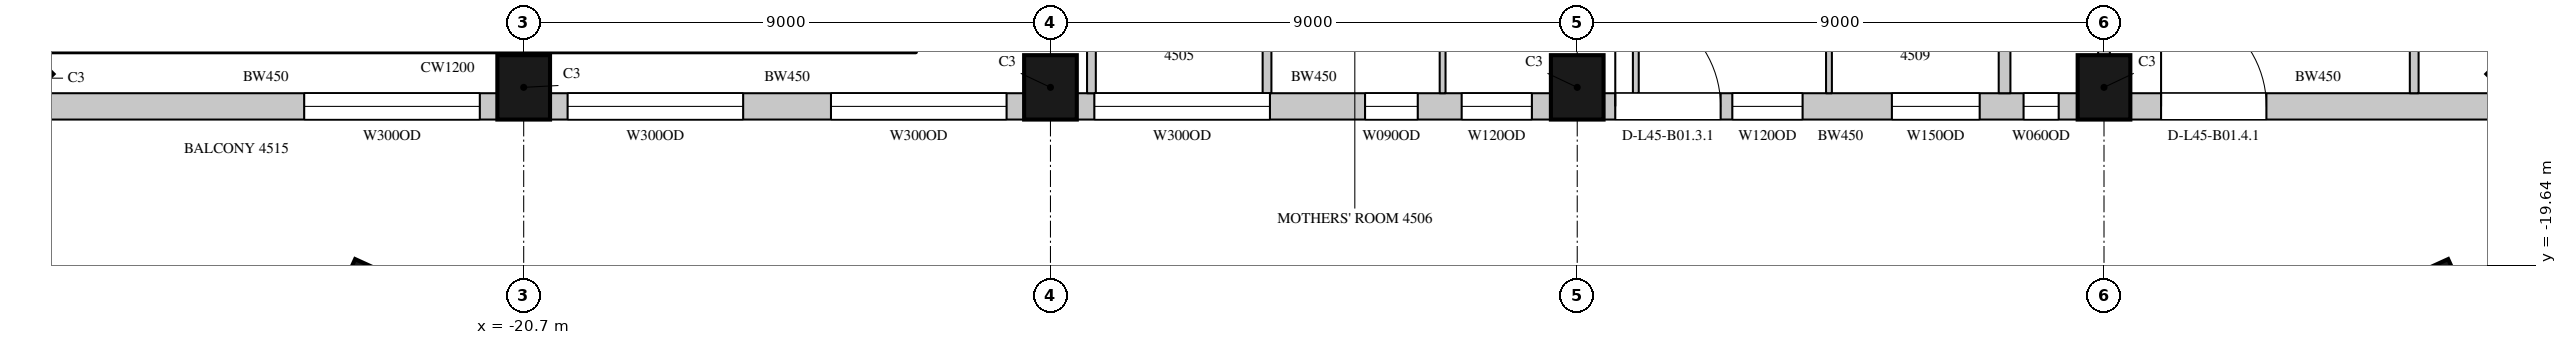
"""IFC4 building model, lengths in metres.
Left out: names, types, materials, properties, quantities, classifications, styles, units other than length and angle.
Written with IfcOpenShell. Run it as: python <this file> out.ifc"""

import sys

from ifc_helpers import new_model, si_unit, direction, frame, frame_2d, origin, origin_2d, place, context, subcontext, project, spatial, rectangle, extrude, element, fill, save


model = new_model("IFC4")
c1 = context("Model", 3, precision=1e-05, world=origin(), true_north=direction((0.0, 1.0)))
c2 = subcontext(c1, "Body", "Model", "MODEL_VIEW")
j1 = project(units=[si_unit("LENGTHUNIT", "METRE"), si_unit("PLANEANGLEUNIT", "RADIAN")], contexts=[c1])
p1 = place(None, origin())
s1 = spatial("IfcSite", under=j1, at=p1, CompositionType="ELEMENT")
p2 = place(p1, origin())
s2 = spatial("IfcBuilding", under=s1, at=p2, CompositionType="ELEMENT")
p3 = place(p2, frame((0.0, 0.0, 205.6)))
s3 = spatial("IfcBuildingStorey", under=s2, at=p3, CompositionType="ELEMENT", Elevation=205.6)
for number, where, z_axis, x_axis in (
    (1, (-29.443, -16.443, 0.0), (0.0, 0.0, 1.0), (0.707, -0.707, 0.0)),
    (2, (-20.7, -16.6, 0.0), (0.0, 0.0, 1.0), (1.0, 0.0, 0.0)),
    (3, (-11.7, -16.6, 0.0), (0.0, 0.0, 1.0), (1.0, 0.0, 0.0)),
    (4, (-2.7, -16.6, 0.0), (0.0, 0.0, 1.0), (1.0, 0.0, 0.0)),
    (5, (6.3, -16.6, 0.0), (0.0, 0.0, 1.0), (1.0, 0.0, 0.0)),
    (6, (13.543, -16.443, 0.0), (0.0, 0.0, 1.0), (0.707, 0.707, 0.0)),
    (7, (-23.398, -20.221, 0.0), (0.0, 0.0, 1.0), (0.91, -0.415, 0.0)),
    (8, (11.998, -20.221, 0.0), (0.0, 0.0, 1.0), (0.91, 0.415, 0.0)),
):
    element("IfcColumn", number, at=place(p3, frame(where, z_axis=z_axis, x_axis=x_axis)), inside=s3, PredefinedType="COLUMN", context=c2, shape_type="SweptSolid", body=[
        extrude(rectangle(XDim=0.9, YDim=1.1, at=origin_2d()), origin(), (0.0, 0.0, 1.0), 4.1),
    ])
p4 = place(p3, frame((-29.064, -16.925, 0.0), z_axis=(0.0, 0.0, 1.0), x_axis=(1.0, 0.0, 0.0)))
e9 = element("IfcWall", 9, at=p4, inside=s3, PredefinedType="SOLIDWALL", context=c2, shape_type="SweptSolid", body=[
    extrude(rectangle(XDim=7.914, YDim=0.45, at=frame_2d((3.957, 0.0))), origin(), (0.0, 0.0, 1.0), 3.8),
])
p5 = place(p4, frame((4.614, 0.0, 1.05)))
e10 = element("IfcOpeningElement", 10, at=p5, cuts=e9, PredefinedType="OPENING", context=c2, shape_type="SweptSolid", body=[
    extrude(rectangle(XDim=3.0, YDim=2.4, at=frame_2d((1.5, 1.2))), frame((0.0, 0.235, 0.0), z_axis=(0.0, -1.0, 0.0), x_axis=(1.0, 0.0, 0.0)), (0.0, 0.0, 1.0), 0.47),
])
p6 = place(p3, frame((-20.25, -16.925, 0.0), z_axis=(0.0, 0.0, 1.0), x_axis=(1.0, 0.0, 0.0)))
e11 = element("IfcWall", 11, at=p6, inside=s3, PredefinedType="SOLIDWALL", context=c2, shape_type="SweptSolid", body=[
    extrude(rectangle(XDim=8.1, YDim=0.45, at=frame_2d((4.05, 0.0))), origin(), (0.0, 0.0, 1.0), 3.8),
])
p7 = place(p6, frame((0.3, 0.0, 1.05)))
e12 = element("IfcOpeningElement", 12, at=p7, cuts=e11, PredefinedType="OPENING", context=c2, shape_type="SweptSolid", body=[
    extrude(rectangle(XDim=3.0, YDim=2.4, at=frame_2d((1.5, 1.2))), frame((0.0, 0.235, 0.0), z_axis=(0.0, -1.0, 0.0), x_axis=(1.0, 0.0, 0.0)), (0.0, 0.0, 1.0), 0.47),
])
p8 = place(p6, frame((4.8, 0.0, 1.05)))
e13 = element("IfcOpeningElement", 13, at=p8, cuts=e11, PredefinedType="OPENING", context=c2, shape_type="SweptSolid", body=[
    extrude(rectangle(XDim=3.0, YDim=2.4, at=frame_2d((1.5, 1.2))), frame((0.0, 0.235, 0.0), z_axis=(0.0, -1.0, 0.0), x_axis=(1.0, 0.0, 0.0)), (0.0, 0.0, 1.0), 0.47),
])
p9 = place(p3, frame((-11.25, -16.925, 0.0), z_axis=(0.0, 0.0, 1.0), x_axis=(1.0, 0.0, 0.0)))
e14 = element("IfcWall", 14, at=p9, inside=s3, PredefinedType="SOLIDWALL", context=c2, shape_type="SweptSolid", body=[
    extrude(rectangle(XDim=8.1, YDim=0.45, at=frame_2d((4.05, 0.0))), origin(), (0.0, 0.0, 1.0), 3.8),
])
p10 = place(p9, frame((0.3, 0.0, 1.05)))
e15 = element("IfcOpeningElement", 15, at=p10, cuts=e14, PredefinedType="OPENING", context=c2, shape_type="SweptSolid", body=[
    extrude(rectangle(XDim=3.0, YDim=2.4, at=frame_2d((1.5, 1.2))), frame((0.0, 0.235, 0.0), z_axis=(0.0, -1.0, 0.0), x_axis=(1.0, 0.0, 0.0)), (0.0, 0.0, 1.0), 0.47),
])
p11 = place(p9, frame((4.925, 0.0, 1.05)))
e16 = element("IfcOpeningElement", 16, at=p11, cuts=e14, PredefinedType="OPENING", context=c2, shape_type="SweptSolid", body=[
    extrude(rectangle(XDim=0.9, YDim=2.4, at=frame_2d((0.45, 1.2))), frame((0.0, 0.235, 0.0), z_axis=(0.0, -1.0, 0.0), x_axis=(1.0, 0.0, 0.0)), (0.0, 0.0, 1.0), 0.47),
])
p12 = place(p9, frame((6.575, 0.0, 1.05)))
e17 = element("IfcOpeningElement", 17, at=p12, cuts=e14, PredefinedType="OPENING", context=c2, shape_type="SweptSolid", body=[
    extrude(rectangle(XDim=1.2, YDim=2.4, at=frame_2d((0.6, 1.2))), frame((0.0, 0.235, 0.0), z_axis=(0.0, -1.0, 0.0), x_axis=(1.0, 0.0, 0.0)), (0.0, 0.0, 1.0), 0.47),
])
p13 = place(p3, frame((-2.25, -16.925, 0.0), z_axis=(0.0, 0.0, 1.0), x_axis=(1.0, 0.0, 0.0)))
e18 = element("IfcWall", 18, at=p13, inside=s3, PredefinedType="SOLIDWALL", context=c2, shape_type="SweptSolid", body=[
    extrude(rectangle(XDim=8.1, YDim=0.45, at=frame_2d((4.05, 0.0))), origin(), (0.0, 0.0, 1.0), 3.8),
])
p14 = place(p13, frame((0.2, 0.0, 0.0)))
e19 = element("IfcOpeningElement", 19, at=p14, cuts=e18, PredefinedType="OPENING", context=c2, shape_type="SweptSolid", body=[
    extrude(rectangle(XDim=1.8, YDim=2.4, at=frame_2d((0.9, 1.2))), frame((0.0, 0.235, 0.0), z_axis=(0.0, -1.0, 0.0), x_axis=(1.0, 0.0, 0.0)), (0.0, 0.0, 1.0), 0.47),
])
p15 = place(p13, frame((2.2, 0.0, 1.05)))
e20 = element("IfcOpeningElement", 20, at=p15, cuts=e18, PredefinedType="OPENING", context=c2, shape_type="SweptSolid", body=[
    extrude(rectangle(XDim=1.2, YDim=2.4, at=frame_2d((0.6, 1.2))), frame((0.0, 0.235, 0.0), z_axis=(0.0, -1.0, 0.0), x_axis=(1.0, 0.0, 0.0)), (0.0, 0.0, 1.0), 0.47),
])
p16 = place(p13, frame((4.926, 0.0, 1.05)))
e21 = element("IfcOpeningElement", 21, at=p16, cuts=e18, PredefinedType="OPENING", context=c2, shape_type="SweptSolid", body=[
    extrude(rectangle(XDim=1.5, YDim=2.4, at=frame_2d((0.75, 1.2))), frame((0.0, 0.235, 0.0), z_axis=(0.0, -1.0, 0.0), x_axis=(1.0, 0.0, 0.0)), (0.0, 0.0, 1.0), 0.47),
])
p17 = place(p13, frame((7.176, 0.0, 1.05)))
e22 = element("IfcOpeningElement", 22, at=p17, cuts=e18, PredefinedType="OPENING", context=c2, shape_type="SweptSolid", body=[
    extrude(rectangle(XDim=0.6, YDim=2.4, at=frame_2d((0.3, 1.2))), frame((0.0, 0.235, 0.0), z_axis=(0.0, -1.0, 0.0), x_axis=(1.0, 0.0, 0.0)), (0.0, 0.0, 1.0), 0.47),
])
p18 = place(p3, frame((6.75, -16.925, 0.0), z_axis=(0.0, 0.0, 1.0), x_axis=(1.0, 0.0, 0.0)))
e23 = element("IfcWall", 23, at=p18, inside=s3, PredefinedType="SOLIDWALL", context=c2, shape_type="SweptSolid", body=[
    extrude(rectangle(XDim=6.414, YDim=0.45, at=frame_2d((3.207, 0.0))), origin(), (0.0, 0.0, 1.0), 3.8),
])
p19 = place(p18, frame((0.525, 0.0, 0.0)))
e24 = element("IfcOpeningElement", 24, at=p19, cuts=e23, PredefinedType="OPENING", context=c2, shape_type="SweptSolid", body=[
    extrude(rectangle(XDim=1.8, YDim=2.4, at=frame_2d((0.9, 1.2))), frame((0.0, 0.235, 0.0), z_axis=(0.0, -1.0, 0.0), x_axis=(1.0, 0.0, 0.0)), (0.0, 0.0, 1.0), 0.47),
])
p20 = place(p3, frame((-11.0, -16.7, 0.0), z_axis=(0.0, 0.0, 1.0), x_axis=(0.0, 1.0, 0.0)))
e25 = element("IfcWall", 25, at=p20, inside=s3, PredefinedType="PARTITIONING", context=c2, shape_type="SweptSolid", body=[
    extrude(rectangle(XDim=1.88, YDim=0.15, at=frame_2d((0.94, 0.0))), origin(), (0.0, 0.0, 1.0), 3.8),
])
p21 = place(p3, frame((-8.0, -16.7, 0.0), z_axis=(0.0, 0.0, 1.0), x_axis=(0.0, 1.0, 0.0)))
e26 = element("IfcWall", 26, at=p21, inside=s3, PredefinedType="PARTITIONING", context=c2, shape_type="SweptSolid", body=[
    extrude(rectangle(XDim=4.0, YDim=0.15, at=frame_2d((2.0, 0.0))), origin(), (0.0, 0.0, 1.0), 3.8),
])
p22 = place(p3, frame((11.6, -16.7, 0.0), z_axis=(0.0, 0.0, 1.0), x_axis=(0.0, 1.0, 0.0)))
e27 = element("IfcWall", 27, at=p22, inside=s3, PredefinedType="PARTITIONING", context=c2, shape_type="SweptSolid", body=[
    extrude(rectangle(XDim=4.1, YDim=0.15, at=frame_2d((2.05, 0.0))), origin(), (0.0, 0.0, 1.0), 3.8),
])
p23 = place(p3, frame((4.601, -16.7, 0.0), z_axis=(0.0, 0.0, 1.0), x_axis=(0.0, 1.0, 0.0)))
e28 = element("IfcWall", 28, at=p23, inside=s3, PredefinedType="PARTITIONING", context=c2, shape_type="SweptSolid", body=[
    extrude(rectangle(XDim=4.0, YDim=0.2, at=frame_2d((2.0, 0.0))), origin(), (0.0, 0.0, 1.0), 3.8),
])
p24 = place(p3, frame((6.3, -16.05, 0.0), z_axis=(0.0, 0.0, 1.0), x_axis=(0.0, 1.0, 0.0)))
e29 = element("IfcWall", 29, at=p24, inside=s3, PredefinedType="PARTITIONING", context=c2, shape_type="SweptSolid", body=[
    extrude(rectangle(XDim=3.35, YDim=0.2, at=frame_2d((1.675, 0.0))), origin(), (0.0, 0.0, 1.0), 3.25),
])
for number, where, z_axis, x_axis in (
    (30, (-5.0, -16.7, 0.0), (0.0, 0.0, 1.0), (0.0, 1.0, 0.0)),
    (31, (-1.699, -16.7, 0.0), (0.0, 0.0, 1.0), (0.0, 1.0, 0.0)),
):
    element("IfcWall", number, at=place(p3, frame(where, z_axis=z_axis, x_axis=x_axis)), inside=s3, PredefinedType="PARTITIONING", context=c2, shape_type="SweptSolid", body=[
        extrude(rectangle(XDim=4.0, YDim=0.1, at=frame_2d((2.0, 0.0))), origin(), (0.0, 0.0, 1.0), 3.8),
    ])
p25 = place(p3, frame((1.601, -16.7, 0.0), z_axis=(0.0, 0.0, 1.0), x_axis=(0.0, 1.0, 0.0)))
e32 = element("IfcWall", 32, at=p25, inside=s3, PredefinedType="PARTITIONING", context=c2, shape_type="SweptSolid", body=[
    extrude(rectangle(XDim=4.0, YDim=0.1, at=frame_2d((2.0, 0.0))), origin(), (0.0, 0.0, 1.0), 3.15),
])
p26 = place(p5, origin())
e33 = element("IfcWindow", 33, at=p26, inside=s3, PartitioningType="SINGLE_PANEL", PredefinedType="WINDOW", context=c2, shape_type="SweptSolid", body=[
    extrude(rectangle(XDim=3.0, YDim=2.4, at=frame_2d((1.5, 1.2))), frame((0.0, 0.135, 0.0), z_axis=(0.0, -1.0, 0.0), x_axis=(1.0, 0.0, 0.0)), (0.0, 0.0, 1.0), 0.06),
])
fill(e10, e33)
p27 = place(p7, origin())
e34 = element("IfcWindow", 34, at=p27, inside=s3, PartitioningType="SINGLE_PANEL", PredefinedType="WINDOW", context=c2, shape_type="SweptSolid", body=[
    extrude(rectangle(XDim=3.0, YDim=2.4, at=frame_2d((1.5, 1.2))), frame((0.0, 0.135, 0.0), z_axis=(0.0, -1.0, 0.0), x_axis=(1.0, 0.0, 0.0)), (0.0, 0.0, 1.0), 0.06),
])
fill(e12, e34)
p28 = place(p8, origin())
e35 = element("IfcWindow", 35, at=p28, inside=s3, PartitioningType="SINGLE_PANEL", PredefinedType="WINDOW", context=c2, shape_type="SweptSolid", body=[
    extrude(rectangle(XDim=3.0, YDim=2.4, at=frame_2d((1.5, 1.2))), frame((0.0, 0.135, 0.0), z_axis=(0.0, -1.0, 0.0), x_axis=(1.0, 0.0, 0.0)), (0.0, 0.0, 1.0), 0.06),
])
fill(e13, e35)
p29 = place(p10, origin())
e36 = element("IfcWindow", 36, at=p29, inside=s3, PartitioningType="SINGLE_PANEL", PredefinedType="WINDOW", context=c2, shape_type="SweptSolid", body=[
    extrude(rectangle(XDim=3.0, YDim=2.4, at=frame_2d((1.5, 1.2))), frame((0.0, 0.135, 0.0), z_axis=(0.0, -1.0, 0.0), x_axis=(1.0, 0.0, 0.0)), (0.0, 0.0, 1.0), 0.06),
])
fill(e15, e36)
p30 = place(p14, origin())
e37 = element("IfcDoor", 37, at=p30, inside=s3, OperationType="SLIDING_TO_LEFT", PredefinedType="DOOR", context=c2, shape_type="SweptSolid", body=[
    extrude(rectangle(XDim=1.8, YDim=2.4, at=frame_2d((0.9, 1.2))), frame((0.0, 0.13, 0.0), z_axis=(0.0, -1.0, 0.0), x_axis=(1.0, 0.0, 0.0)), (0.0, 0.0, 1.0), 0.05),
])
fill(e19, e37)
p31 = place(p15, origin())
e38 = element("IfcWindow", 38, at=p31, inside=s3, PartitioningType="SINGLE_PANEL", PredefinedType="WINDOW", context=c2, shape_type="SweptSolid", body=[
    extrude(rectangle(XDim=1.2, YDim=2.4, at=frame_2d((0.6, 1.2))), frame((0.0, 0.135, 0.0), z_axis=(0.0, -1.0, 0.0), x_axis=(1.0, 0.0, 0.0)), (0.0, 0.0, 1.0), 0.06),
])
fill(e20, e38)
p32 = place(p19, origin())
e39 = element("IfcDoor", 39, at=p32, inside=s3, OperationType="SLIDING_TO_LEFT", PredefinedType="DOOR", context=c2, shape_type="SweptSolid", body=[
    extrude(rectangle(XDim=1.8, YDim=2.4, at=frame_2d((0.9, 1.2))), frame((0.0, 0.13, 0.0), z_axis=(0.0, -1.0, 0.0), x_axis=(1.0, 0.0, 0.0)), (0.0, 0.0, 1.0), 0.05),
])
fill(e24, e39)
p33 = place(p11, origin())
e40 = element("IfcWindow", 40, at=p33, inside=s3, PartitioningType="SINGLE_PANEL", PredefinedType="WINDOW", context=c2, shape_type="SweptSolid", body=[
    extrude(rectangle(XDim=0.9, YDim=2.4, at=frame_2d((0.45, 1.2))), frame((0.0, 0.135, 0.0), z_axis=(0.0, -1.0, 0.0), x_axis=(1.0, 0.0, 0.0)), (0.0, 0.0, 1.0), 0.06),
])
fill(e16, e40)
p34 = place(p12, origin())
e41 = element("IfcWindow", 41, at=p34, inside=s3, PartitioningType="SINGLE_PANEL", PredefinedType="WINDOW", context=c2, shape_type="SweptSolid", body=[
    extrude(rectangle(XDim=1.2, YDim=2.4, at=frame_2d((0.6, 1.2))), frame((0.0, 0.135, 0.0), z_axis=(0.0, -1.0, 0.0), x_axis=(1.0, 0.0, 0.0)), (0.0, 0.0, 1.0), 0.06),
])
fill(e17, e41)
p35 = place(p16, origin())
e42 = element("IfcWindow", 42, at=p35, inside=s3, PartitioningType="SINGLE_PANEL", PredefinedType="WINDOW", context=c2, shape_type="SweptSolid", body=[
    extrude(rectangle(XDim=1.5, YDim=2.4, at=frame_2d((0.75, 1.2))), frame((0.0, 0.135, 0.0), z_axis=(0.0, -1.0, 0.0), x_axis=(1.0, 0.0, 0.0)), (0.0, 0.0, 1.0), 0.06),
])
fill(e21, e42)
p36 = place(p17, origin())
e43 = element("IfcWindow", 43, at=p36, inside=s3, PartitioningType="SINGLE_PANEL", PredefinedType="WINDOW", context=c2, shape_type="SweptSolid", body=[
    extrude(rectangle(XDim=0.6, YDim=2.4, at=frame_2d((0.3, 1.2))), frame((0.0, 0.135, 0.0), z_axis=(0.0, -1.0, 0.0), x_axis=(1.0, 0.0, 0.0)), (0.0, 0.0, 1.0), 0.06),
])
fill(e22, e43)
save(model, sys.argv[1])
